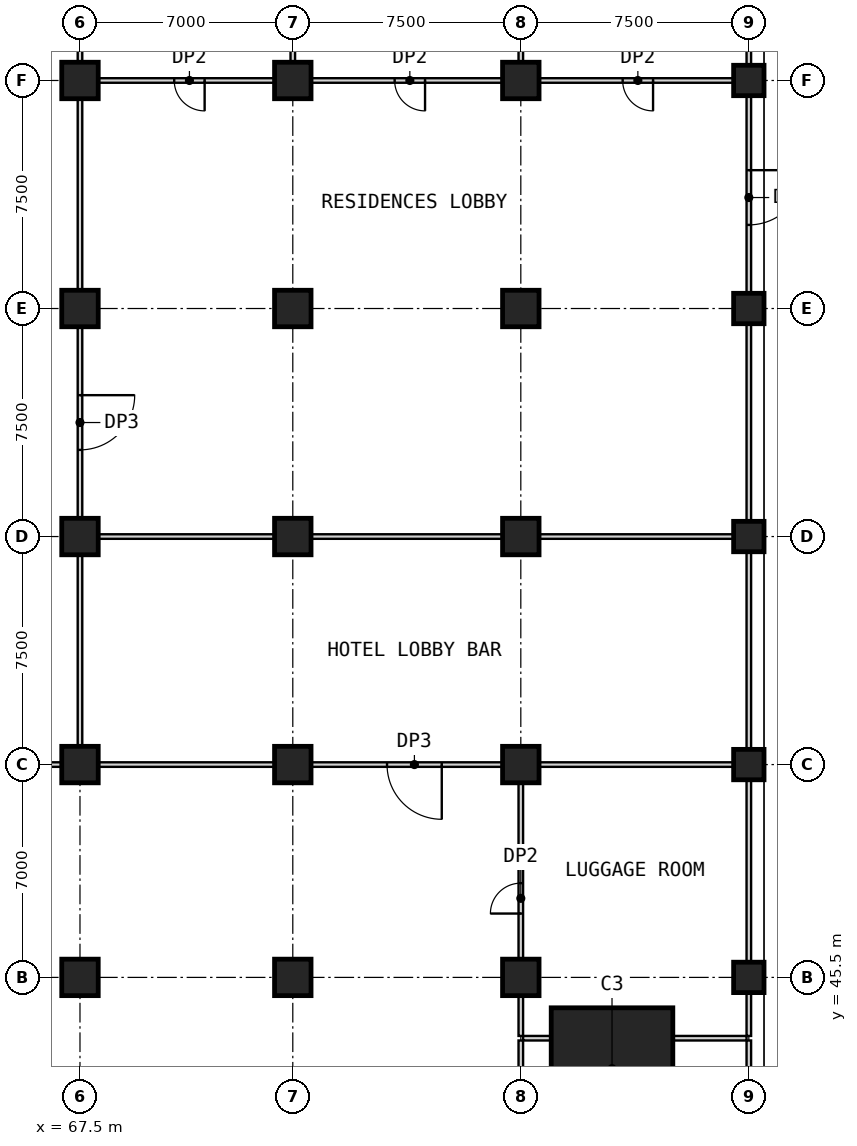
"""IFC4 building model, lengths in metres.
Left out: names, types, materials, properties, quantities, classifications, styles, units other than length and angle.
Written with IfcOpenShell. Run it as: python <this file> out.ifc"""

import sys

from ifc_helpers import new_model, si_unit, direction, frame, frame_2d, origin, origin_2d, place, context, subcontext, project, spatial, rectangle, extrude, element, fill, save


model = new_model("IFC4")
c1 = context("Model", 3, precision=1e-05, world=origin(), true_north=direction((0.0, 1.0)))
c2 = subcontext(c1, "Body", "Model", "MODEL_VIEW")
j1 = project(units=[si_unit("LENGTHUNIT", "METRE"), si_unit("PLANEANGLEUNIT", "RADIAN")], contexts=[c1])
p1 = place(None, origin())
s1 = spatial("IfcSite", under=j1, at=p1, CompositionType="ELEMENT")
p2 = place(p1, origin())
s2 = spatial("IfcBuilding", under=s1, at=p2, CompositionType="ELEMENT")
p3 = place(p2, origin())
s3 = spatial("IfcBuildingStorey", under=s2, at=p3, CompositionType="ELEMENT", Elevation=0.0)
for number, where, z_axis, x_axis in (
    (1, (67.5, 45.5, 0.0), (0.0, 0.0, 1.0), (1.0, 0.0, 0.0)),
    (2, (67.5, 52.5, 0.0), (0.0, 0.0, 1.0), (1.0, 0.0, 0.0)),
    (3, (67.5, 60.0, 0.0), (0.0, 0.0, 1.0), (1.0, 0.0, 0.0)),
    (4, (67.5, 67.5, 0.0), (0.0, 0.0, 1.0), (1.0, 0.0, 0.0)),
    (5, (67.5, 75.0, 0.0), (0.0, 0.0, 1.0), (1.0, 0.0, 0.0)),
    (6, (74.5, 45.5, 0.0), (0.0, 0.0, 1.0), (1.0, 0.0, 0.0)),
    (7, (74.5, 52.5, 0.0), (0.0, 0.0, 1.0), (1.0, 0.0, 0.0)),
    (8, (74.5, 60.0, 0.0), (0.0, 0.0, 1.0), (1.0, 0.0, 0.0)),
    (9, (74.5, 67.5, 0.0), (0.0, 0.0, 1.0), (1.0, 0.0, 0.0)),
    (10, (74.5, 75.0, 0.0), (0.0, 0.0, 1.0), (1.0, 0.0, 0.0)),
    (11, (82.0, 45.5, 0.0), (0.0, 0.0, 1.0), (1.0, 0.0, 0.0)),
    (12, (82.0, 52.5, 0.0), (0.0, 0.0, 1.0), (1.0, 0.0, 0.0)),
    (13, (82.0, 60.0, 0.0), (0.0, 0.0, 1.0), (1.0, 0.0, 0.0)),
    (14, (82.0, 67.5, 0.0), (0.0, 0.0, 1.0), (1.0, 0.0, 0.0)),
    (15, (82.0, 75.0, 0.0), (0.0, 0.0, 1.0), (1.0, 0.0, 0.0)),
):
    element("IfcColumn", number, at=place(p3, frame(where, z_axis=z_axis, x_axis=x_axis)), inside=s3, PredefinedType="COLUMN", context=c2, shape_type="SweptSolid", body=[
        extrude(rectangle(XDim=1.2, YDim=1.2, at=origin_2d()), origin(), (0.0, 0.0, 1.0), 8.0),
    ])
for number, where, z_axis, x_axis in (
    (16, (89.5, 45.5, 0.0), (0.0, 0.0, 1.0), (1.0, 0.0, 0.0)),
    (17, (89.5, 52.5, 0.0), (0.0, 0.0, 1.0), (1.0, 0.0, 0.0)),
    (18, (89.5, 60.0, 0.0), (0.0, 0.0, 1.0), (1.0, 0.0, 0.0)),
    (19, (89.5, 67.5, 0.0), (0.0, 0.0, 1.0), (1.0, 0.0, 0.0)),
    (20, (89.5, 75.0, 0.0), (0.0, 0.0, 1.0), (1.0, 0.0, 0.0)),
):
    element("IfcColumn", number, at=place(p3, frame(where, z_axis=z_axis, x_axis=x_axis)), inside=s3, PredefinedType="COLUMN", context=c2, shape_type="SweptSolid", body=[
        extrude(rectangle(XDim=1.0, YDim=1.0, at=origin_2d()), origin(), (0.0, 0.0, 1.0), 8.0),
    ])
p4 = place(p3, frame((85.0, 42.5, 0.0), z_axis=(0.0, 0.0, 1.0), x_axis=(1.0, 0.0, 0.0)))
e21 = element("IfcColumn", 21, at=p4, inside=s3, PredefinedType="COLUMN", context=c2, shape_type="SweptSolid", body=[
    extrude(rectangle(XDim=4.0, YDim=4.0, at=origin_2d()), origin(), (0.0, 0.0, 1.0), 8.0),
])
p5 = place(p3, frame((66.9, 52.5, 0.0), z_axis=(0.0, 0.0, 1.0), x_axis=(-1.0, 0.0, 0.0)))
e22 = element("IfcWall", 22, at=p5, inside=s3, PredefinedType="PARTITIONING", context=c2, shape_type="SweptSolid", body=[
    extrude(rectangle(XDim=6.3, YDim=0.15, at=frame_2d((3.15, 0.0))), origin(), (0.0, 0.0, 1.0), 7.7),
])
p6 = place(p5, frame((2.25, 0.0, 0.0)))
e23 = element("IfcOpeningElement", 23, at=p6, cuts=e22, PredefinedType="OPENING", context=c2, shape_type="SweptSolid", body=[
    extrude(rectangle(XDim=1.8, YDim=2.4, at=frame_2d((0.9, 1.2))), frame((0.0, 0.085, 0.0), z_axis=(0.0, -1.0, 0.0), x_axis=(1.0, 0.0, 0.0)), (0.0, 0.0, 1.0), 0.17),
])
p7 = place(p3, frame((68.1, 52.5, 0.0), z_axis=(0.0, 0.0, 1.0), x_axis=(1.0, 0.0, 0.0)))
e24 = element("IfcWall", 24, at=p7, inside=s3, PredefinedType="PARTITIONING", context=c2, shape_type="SweptSolid", body=[
    extrude(rectangle(XDim=5.8, YDim=0.15, at=frame_2d((2.9, 0.0))), origin(), (0.0, 0.0, 1.0), 7.7),
])
p8 = place(p3, frame((81.4, 52.5, 0.0), z_axis=(0.0, 0.0, 1.0), x_axis=(-1.0, 0.0, 0.0)))
e25 = element("IfcWall", 25, at=p8, inside=s3, PredefinedType="PARTITIONING", context=c2, shape_type="SweptSolid", body=[
    extrude(rectangle(XDim=6.3, YDim=0.15, at=frame_2d((3.15, 0.0))), origin(), (0.0, 0.0, 1.0), 7.7),
])
p9 = place(p8, frame((2.0, 0.0, 0.0)))
e26 = element("IfcOpeningElement", 26, at=p9, cuts=e25, PredefinedType="OPENING", context=c2, shape_type="SweptSolid", body=[
    extrude(rectangle(XDim=1.8, YDim=2.4, at=frame_2d((0.9, 1.2))), frame((0.0, 0.085, 0.0), z_axis=(0.0, -1.0, 0.0), x_axis=(1.0, 0.0, 0.0)), (0.0, 0.0, 1.0), 0.17),
])
p10 = place(p3, frame((82.6, 52.5, 0.0), z_axis=(0.0, 0.0, 1.0), x_axis=(1.0, 0.0, 0.0)))
e27 = element("IfcWall", 27, at=p10, inside=s3, PredefinedType="PARTITIONING", context=c2, shape_type="SweptSolid", body=[
    extrude(rectangle(XDim=6.4, YDim=0.15, at=frame_2d((3.2, 0.0))), origin(), (0.0, 0.0, 1.0), 7.7),
])
p11 = place(p3, frame((68.1, 60.0, 0.0), z_axis=(0.0, 0.0, 1.0), x_axis=(1.0, 0.0, 0.0)))
e28 = element("IfcWall", 28, at=p11, inside=s3, PredefinedType="PARTITIONING", context=c2, shape_type="SweptSolid", body=[
    extrude(rectangle(XDim=5.8, YDim=0.15, at=frame_2d((2.9, 0.0))), origin(), (0.0, 0.0, 1.0), 7.7),
])
p12 = place(p3, frame((75.1, 60.0, 0.0), z_axis=(0.0, 0.0, 1.0), x_axis=(1.0, 0.0, 0.0)))
e29 = element("IfcWall", 29, at=p12, inside=s3, PredefinedType="PARTITIONING", context=c2, shape_type="SweptSolid", body=[
    extrude(rectangle(XDim=6.3, YDim=0.15, at=frame_2d((3.15, 0.0))), origin(), (0.0, 0.0, 1.0), 7.7),
])
p13 = place(p3, frame((82.6, 60.0, 0.0), z_axis=(0.0, 0.0, 1.0), x_axis=(1.0, 0.0, 0.0)))
e30 = element("IfcWall", 30, at=p13, inside=s3, PredefinedType="PARTITIONING", context=c2, shape_type="SweptSolid", body=[
    extrude(rectangle(XDim=6.4, YDim=0.15, at=frame_2d((3.2, 0.0))), origin(), (0.0, 0.0, 1.0), 7.7),
])
p14 = place(p3, frame((82.075, 43.5, 0.0), z_axis=(0.0, 0.0, 1.0), x_axis=(1.0, 0.0, 0.0)))
e31 = element("IfcWall", 31, at=p14, inside=s3, PredefinedType="PARTITIONING", context=c2, shape_type="SweptSolid", body=[
    extrude(rectangle(XDim=0.925, YDim=0.15, at=frame_2d((0.462, 0.0))), origin(), (0.0, 0.0, 1.0), 7.7),
])
p15 = place(p3, frame((87.0, 43.5, 0.0), z_axis=(0.0, 0.0, 1.0), x_axis=(1.0, 0.0, 0.0)))
e32 = element("IfcWall", 32, at=p15, inside=s3, PredefinedType="PARTITIONING", context=c2, shape_type="SweptSolid", body=[
    extrude(rectangle(XDim=2.425, YDim=0.15, at=frame_2d((1.212, 0.0))), origin(), (0.0, 0.0, 1.0), 7.7),
])
p16 = place(p3, frame((73.9, 75.0, 0.0), z_axis=(0.0, 0.0, 1.0), x_axis=(-1.0, 0.0, 0.0)))
e33 = element("IfcWall", 33, at=p16, inside=s3, PredefinedType="PARTITIONING", context=c2, shape_type="SweptSolid", body=[
    extrude(rectangle(XDim=5.8, YDim=0.15, at=frame_2d((2.9, 0.0))), origin(), (0.0, 0.0, 1.0), 7.7),
])
p17 = place(p16, frame((2.3, 0.0, 0.0)))
e34 = element("IfcOpeningElement", 34, at=p17, cuts=e33, PredefinedType="OPENING", context=c2, shape_type="SweptSolid", body=[
    extrude(rectangle(XDim=1.0, YDim=2.1, at=frame_2d((0.5, 1.05))), frame((0.0, 0.085, 0.0), z_axis=(0.0, -1.0, 0.0), x_axis=(1.0, 0.0, 0.0)), (0.0, 0.0, 1.0), 0.17),
])
p18 = place(p3, frame((81.4, 75.0, 0.0), z_axis=(0.0, 0.0, 1.0), x_axis=(-1.0, 0.0, 0.0)))
e35 = element("IfcWall", 35, at=p18, inside=s3, PredefinedType="PARTITIONING", context=c2, shape_type="SweptSolid", body=[
    extrude(rectangle(XDim=6.3, YDim=0.15, at=frame_2d((3.15, 0.0))), origin(), (0.0, 0.0, 1.0), 7.7),
])
p19 = place(p18, frame((2.55, 0.0, 0.0)))
e36 = element("IfcOpeningElement", 36, at=p19, cuts=e35, PredefinedType="OPENING", context=c2, shape_type="SweptSolid", body=[
    extrude(rectangle(XDim=1.0, YDim=2.1, at=frame_2d((0.5, 1.05))), frame((0.0, 0.085, 0.0), z_axis=(0.0, -1.0, 0.0), x_axis=(1.0, 0.0, 0.0)), (0.0, 0.0, 1.0), 0.17),
])
p20 = place(p3, frame((89.0, 75.0, 0.0), z_axis=(0.0, 0.0, 1.0), x_axis=(-1.0, 0.0, 0.0)))
e37 = element("IfcWall", 37, at=p20, inside=s3, PredefinedType="PARTITIONING", context=c2, shape_type="SweptSolid", body=[
    extrude(rectangle(XDim=6.4, YDim=0.15, at=frame_2d((3.2, 0.0))), origin(), (0.0, 0.0, 1.0), 7.7),
])
p21 = place(p20, frame((2.65, 0.0, 0.0)))
e38 = element("IfcOpeningElement", 38, at=p21, cuts=e37, PredefinedType="OPENING", context=c2, shape_type="SweptSolid", body=[
    extrude(rectangle(XDim=1.0, YDim=2.1, at=frame_2d((0.5, 1.05))), frame((0.0, 0.085, 0.0), z_axis=(0.0, -1.0, 0.0), x_axis=(1.0, 0.0, 0.0)), (0.0, 0.0, 1.0), 0.17),
])
p22 = place(p3, frame((89.5, 38.6, 0.0), z_axis=(0.0, 0.0, 1.0), x_axis=(0.0, 1.0, 0.0)))
e39 = element("IfcWall", 39, at=p22, inside=s3, PredefinedType="PARTITIONING", context=c2, shape_type="SweptSolid", body=[
    extrude(rectangle(XDim=4.825, YDim=0.15, at=frame_2d((2.413, 0.0))), origin(), (0.0, 0.0, 1.0), 7.7),
])
p23 = place(p3, frame((89.5, 43.575, 0.0), z_axis=(0.0, 0.0, 1.0), x_axis=(0.0, 1.0, 0.0)))
e40 = element("IfcWall", 40, at=p23, inside=s3, PredefinedType="PARTITIONING", context=c2, shape_type="SweptSolid", body=[
    extrude(rectangle(XDim=1.425, YDim=0.15, at=frame_2d((0.712, 0.0))), origin(), (0.0, 0.0, 1.0), 7.7),
])
p24 = place(p3, frame((89.5, 46.0, 0.0), z_axis=(0.0, 0.0, 1.0), x_axis=(0.0, 1.0, 0.0)))
e41 = element("IfcWall", 41, at=p24, inside=s3, PredefinedType="PARTITIONING", context=c2, shape_type="SweptSolid", body=[
    extrude(rectangle(XDim=6.0, YDim=0.15, at=frame_2d((3.0, 0.0))), origin(), (0.0, 0.0, 1.0), 7.7),
])
for number, where, z_axis, x_axis in (
    (42, (89.5, 53.0, 0.0), (0.0, 0.0, 1.0), (0.0, 1.0, 0.0)),
    (43, (89.5, 60.5, 0.0), (0.0, 0.0, 1.0), (0.0, 1.0, 0.0)),
):
    element("IfcWall", number, at=place(p3, frame(where, z_axis=z_axis, x_axis=x_axis)), inside=s3, PredefinedType="PARTITIONING", context=c2, shape_type="SweptSolid", body=[
        extrude(rectangle(XDim=6.5, YDim=0.15, at=frame_2d((3.25, 0.0))), origin(), (0.0, 0.0, 1.0), 7.7),
    ])
p25 = place(p3, frame((89.5, 74.5, 0.0), z_axis=(0.0, 0.0, 1.0), x_axis=(0.0, -1.0, 0.0)))
e44 = element("IfcWall", 44, at=p25, inside=s3, PredefinedType="PARTITIONING", context=c2, shape_type="SweptSolid", body=[
    extrude(rectangle(XDim=6.5, YDim=0.15, at=frame_2d((3.25, 0.0))), origin(), (0.0, 0.0, 1.0), 7.7),
])
p26 = place(p25, frame((2.45, 0.0, 0.0)))
e45 = element("IfcOpeningElement", 45, at=p26, cuts=e44, PredefinedType="OPENING", context=c2, shape_type="SweptSolid", body=[
    extrude(rectangle(XDim=1.8, YDim=2.4, at=frame_2d((0.9, 1.2))), frame((0.0, 0.085, 0.0), z_axis=(0.0, -1.0, 0.0), x_axis=(1.0, 0.0, 0.0)), (0.0, 0.0, 1.0), 0.17),
])
p27 = place(p3, frame((89.5, 75.5, 0.0), z_axis=(0.0, 0.0, 1.0), x_axis=(0.0, 1.0, 0.0)))
e46 = element("IfcWall", 46, at=p27, inside=s3, PredefinedType="PARTITIONING", context=c2, shape_type="SweptSolid", body=[
    extrude(rectangle(XDim=6.5, YDim=0.15, at=frame_2d((3.25, 0.0))), origin(), (0.0, 0.0, 1.0), 7.7),
])
p28 = place(p3, frame((67.5, 53.1, 0.0), z_axis=(0.0, 0.0, 1.0), x_axis=(0.0, 1.0, 0.0)))
e47 = element("IfcWall", 47, at=p28, inside=s3, PredefinedType="PARTITIONING", context=c2, shape_type="SweptSolid", body=[
    extrude(rectangle(XDim=6.3, YDim=0.15, at=frame_2d((3.15, 0.0))), origin(), (0.0, 0.0, 1.0), 7.7),
])
p29 = place(p3, frame((67.5, 66.9, 0.0), z_axis=(0.0, 0.0, 1.0), x_axis=(0.0, -1.0, 0.0)))
e48 = element("IfcWall", 48, at=p29, inside=s3, PredefinedType="PARTITIONING", context=c2, shape_type="SweptSolid", body=[
    extrude(rectangle(XDim=6.3, YDim=0.15, at=frame_2d((3.15, 0.0))), origin(), (0.0, 0.0, 1.0), 7.7),
])
p30 = place(p29, frame((2.25, 0.0, 0.0)))
e49 = element("IfcOpeningElement", 49, at=p30, cuts=e48, PredefinedType="OPENING", context=c2, shape_type="SweptSolid", body=[
    extrude(rectangle(XDim=1.8, YDim=2.4, at=frame_2d((0.9, 1.2))), frame((0.0, 0.085, 0.0), z_axis=(0.0, -1.0, 0.0), x_axis=(1.0, 0.0, 0.0)), (0.0, 0.0, 1.0), 0.17),
])
for number, where, z_axis, x_axis in (
    (50, (67.5, 68.1, 0.0), (0.0, 0.0, 1.0), (0.0, 1.0, 0.0)),
    (51, (67.5, 75.6, 0.0), (0.0, 0.0, 1.0), (0.0, 1.0, 0.0)),
    (52, (74.5, 75.6, 0.0), (0.0, 0.0, 1.0), (0.0, 1.0, 0.0)),
):
    element("IfcWall", number, at=place(p3, frame(where, z_axis=z_axis, x_axis=x_axis)), inside=s3, PredefinedType="PARTITIONING", context=c2, shape_type="SweptSolid", body=[
        extrude(rectangle(XDim=6.3, YDim=0.15, at=frame_2d((3.15, 0.0))), origin(), (0.0, 0.0, 1.0), 7.7),
    ])
p31 = place(p3, frame((82.0, 38.5, 0.0), z_axis=(0.0, 0.0, 1.0), x_axis=(0.0, 1.0, 0.0)))
e53 = element("IfcWall", 53, at=p31, inside=s3, PredefinedType="PARTITIONING", context=c2, shape_type="SweptSolid", body=[
    extrude(rectangle(XDim=4.925, YDim=0.15, at=frame_2d((2.462, 0.0))), origin(), (0.0, 0.0, 1.0), 7.7),
])
p32 = place(p31, frame((0.75, 0.0, 0.0)))
e54 = element("IfcOpeningElement", 54, at=p32, cuts=e53, PredefinedType="OPENING", context=c2, shape_type="SweptSolid", body=[
    extrude(rectangle(XDim=1.0, YDim=2.1, at=frame_2d((0.5, 1.05))), frame((0.0, 0.085, 0.0), z_axis=(0.0, -1.0, 0.0), x_axis=(1.0, 0.0, 0.0)), (0.0, 0.0, 1.0), 0.17),
])
p33 = place(p3, frame((82.0, 43.575, 0.0), z_axis=(0.0, 0.0, 1.0), x_axis=(0.0, 1.0, 0.0)))
e55 = element("IfcWall", 55, at=p33, inside=s3, PredefinedType="PARTITIONING", context=c2, shape_type="SweptSolid", body=[
    extrude(rectangle(XDim=1.325, YDim=0.15, at=frame_2d((0.663, 0.0))), origin(), (0.0, 0.0, 1.0), 7.7),
])
p34 = place(p3, frame((82.0, 46.1, 0.0), z_axis=(0.0, 0.0, 1.0), x_axis=(0.0, 1.0, 0.0)))
e56 = element("IfcWall", 56, at=p34, inside=s3, PredefinedType="PARTITIONING", context=c2, shape_type="SweptSolid", body=[
    extrude(rectangle(XDim=5.8, YDim=0.15, at=frame_2d((2.9, 0.0))), origin(), (0.0, 0.0, 1.0), 7.7),
])
p35 = place(p34, frame((1.5, 0.0, 0.0)))
e57 = element("IfcOpeningElement", 57, at=p35, cuts=e56, PredefinedType="OPENING", context=c2, shape_type="SweptSolid", body=[
    extrude(rectangle(XDim=1.0, YDim=2.1, at=frame_2d((0.5, 1.05))), frame((0.0, 0.085, 0.0), z_axis=(0.0, -1.0, 0.0), x_axis=(1.0, 0.0, 0.0)), (0.0, 0.0, 1.0), 0.17),
])
p36 = place(p3, frame((82.0, 75.6, 0.0), z_axis=(0.0, 0.0, 1.0), x_axis=(0.0, 1.0, 0.0)))
e58 = element("IfcWall", 58, at=p36, inside=s3, PredefinedType="PARTITIONING", context=c2, shape_type="SweptSolid", body=[
    extrude(rectangle(XDim=6.3, YDim=0.15, at=frame_2d((3.15, 0.0))), origin(), (0.0, 0.0, 1.0), 7.7),
])
p37 = place(p9, origin())
e59 = element("IfcDoor", 59, at=p37, inside=s3, OperationType="SINGLE_SWING_LEFT", PredefinedType="DOOR", context=c2, shape_type="SweptSolid", body=[
    extrude(rectangle(XDim=1.8, YDim=2.4, at=frame_2d((0.9, 1.2))), frame((0.0, 0.025, 0.0), z_axis=(0.0, -1.0, 0.0), x_axis=(1.0, 0.0, 0.0)), (0.0, 0.0, 1.0), 0.05),
])
fill(e26, e59)
p38 = place(p17, origin())
e60 = element("IfcDoor", 60, at=p38, inside=s3, OperationType="SINGLE_SWING_LEFT", PredefinedType="DOOR", context=c2, shape_type="SweptSolid", body=[
    extrude(rectangle(XDim=1.0, YDim=2.1, at=frame_2d((0.5, 1.05))), frame((0.0, 0.025, 0.0), z_axis=(0.0, -1.0, 0.0), x_axis=(1.0, 0.0, 0.0)), (0.0, 0.0, 1.0), 0.05),
])
fill(e34, e60)
p39 = place(p19, origin())
e61 = element("IfcDoor", 61, at=p39, inside=s3, OperationType="SINGLE_SWING_LEFT", PredefinedType="DOOR", context=c2, shape_type="SweptSolid", body=[
    extrude(rectangle(XDim=1.0, YDim=2.1, at=frame_2d((0.5, 1.05))), frame((0.0, 0.025, 0.0), z_axis=(0.0, -1.0, 0.0), x_axis=(1.0, 0.0, 0.0)), (0.0, 0.0, 1.0), 0.05),
])
fill(e36, e61)
p40 = place(p21, origin())
e62 = element("IfcDoor", 62, at=p40, inside=s3, OperationType="SINGLE_SWING_LEFT", PredefinedType="DOOR", context=c2, shape_type="SweptSolid", body=[
    extrude(rectangle(XDim=1.0, YDim=2.1, at=frame_2d((0.5, 1.05))), frame((0.0, 0.025, 0.0), z_axis=(0.0, -1.0, 0.0), x_axis=(1.0, 0.0, 0.0)), (0.0, 0.0, 1.0), 0.05),
])
fill(e38, e62)
p41 = place(p26, origin())
e63 = element("IfcDoor", 63, at=p41, inside=s3, OperationType="SINGLE_SWING_LEFT", PredefinedType="DOOR", context=c2, shape_type="SweptSolid", body=[
    extrude(rectangle(XDim=1.8, YDim=2.4, at=frame_2d((0.9, 1.2))), frame((0.0, 0.025, 0.0), z_axis=(0.0, -1.0, 0.0), x_axis=(1.0, 0.0, 0.0)), (0.0, 0.0, 1.0), 0.05),
])
fill(e45, e63)
p42 = place(p30, origin())
e64 = element("IfcDoor", 64, at=p42, inside=s3, OperationType="SINGLE_SWING_LEFT", PredefinedType="DOOR", context=c2, shape_type="SweptSolid", body=[
    extrude(rectangle(XDim=1.8, YDim=2.4, at=frame_2d((0.9, 1.2))), frame((0.0, 0.025, 0.0), z_axis=(0.0, -1.0, 0.0), x_axis=(1.0, 0.0, 0.0)), (0.0, 0.0, 1.0), 0.05),
])
fill(e49, e64)
p43 = place(p35, origin())
e65 = element("IfcDoor", 65, at=p43, inside=s3, OperationType="SINGLE_SWING_LEFT", PredefinedType="DOOR", context=c2, shape_type="SweptSolid", body=[
    extrude(rectangle(XDim=1.0, YDim=2.1, at=frame_2d((0.5, 1.05))), frame((0.0, 0.025, 0.0), z_axis=(0.0, -1.0, 0.0), x_axis=(1.0, 0.0, 0.0)), (0.0, 0.0, 1.0), 0.05),
])
fill(e57, e65)
save(model, sys.argv[1])
